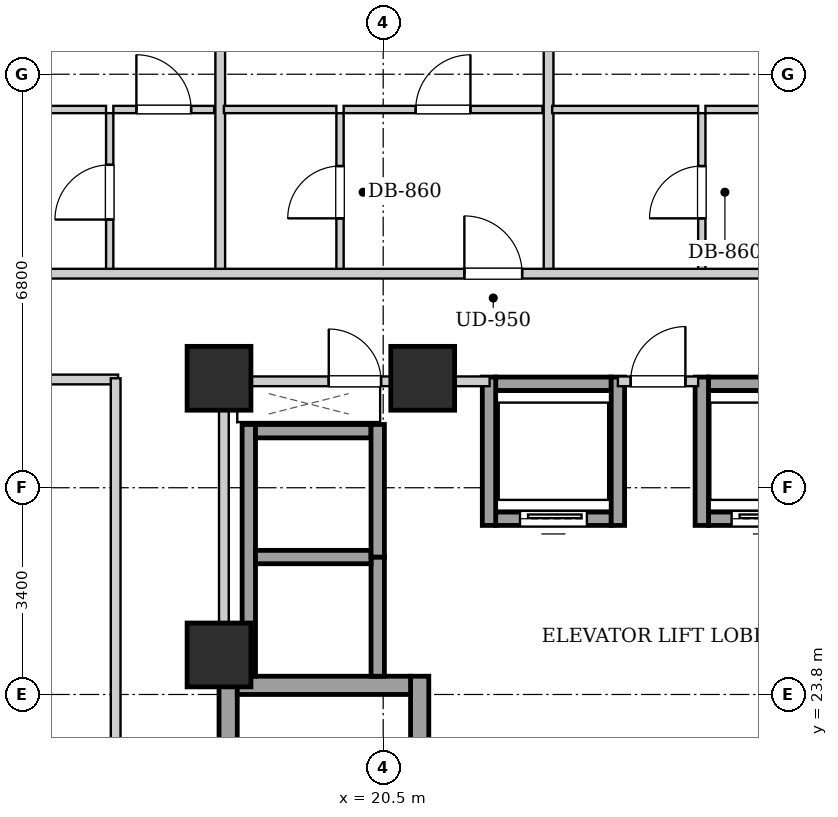
"""IFC4 building model, lengths in metres.
Left out: names, types, materials, properties, quantities, classifications, styles, units other than length and angle.
Written with IfcOpenShell. Run it as: python <this file> out.ifc"""

import sys

from ifc_helpers import new_model, si_unit, direction, frame, frame_2d, origin, origin_2d, place, context, subcontext, project, spatial, rectangle, extrude, element, fill, save


model = new_model("IFC4")
c1 = context("Model", 3, precision=1e-05, world=origin(), true_north=direction((0.0, 1.0)))
c2 = subcontext(c1, "Body", "Model", "MODEL_VIEW")
j1 = project(units=[si_unit("LENGTHUNIT", "METRE"), si_unit("PLANEANGLEUNIT", "RADIAN")], contexts=[c1])
p1 = place(None, origin())
s1 = spatial("IfcSite", under=j1, at=p1, CompositionType="ELEMENT")
p2 = place(p1, origin())
s2 = spatial("IfcBuilding", under=s1, at=p2, CompositionType="ELEMENT")
p3 = place(p2, frame((0.0, 0.0, 103.9)))
s3 = spatial("IfcBuildingStorey", under=s2, at=p3, CompositionType="ELEMENT", Elevation=103.9)
for number, where, z_axis, x_axis in (
    (1, (17.8, 29.0, 0.0), (0.0, 0.0, 1.0), (1.0, 0.0, 0.0)),
    (2, (21.15, 29.0, 0.0), (0.0, 0.0, 1.0), (1.0, 0.0, 0.0)),
    (3, (17.8, 24.45, 0.0), (0.0, 0.0, 1.0), (1.0, 0.0, 0.0)),
):
    element("IfcColumn", number, at=place(p3, frame(where, z_axis=z_axis, x_axis=x_axis)), inside=s3, PredefinedType="COLUMN", context=c2, shape_type="SweptSolid", body=[
        extrude(rectangle(XDim=1.05, YDim=1.05, at=origin_2d()), origin(), (0.0, 0.0, 1.0), 3.2),
    ])
for number, where, z_axis, x_axis in (
    (4, (17.95, 15.1, 0.0), (0.0, 0.0, 1.0), (0.0, 1.0, 0.0)),
    (5, (21.1, 15.1, 0.0), (0.0, 0.0, 1.0), (0.0, 1.0, 0.0)),
):
    element("IfcWall", number, at=place(p3, frame(where, z_axis=z_axis, x_axis=x_axis)), inside=s3, PredefinedType="SHEAR", context=c2, shape_type="SweptSolid", body=[
        extrude(rectangle(XDim=9.0, YDim=0.3, at=frame_2d((4.5, 0.0))), origin(), (0.0, 0.0, 1.0), 2.94),
    ])
p4 = place(p3, frame((18.1, 23.95, 0.0), z_axis=(0.0, 0.0, 1.0), x_axis=(1.0, 0.0, 0.0)))
e6 = element("IfcWall", 6, at=p4, inside=s3, PredefinedType="SHEAR", context=c2, shape_type="SweptSolid", body=[
    extrude(rectangle(XDim=2.85, YDim=0.3, at=frame_2d((1.425, 0.0))), origin(), (0.0, 0.0, 1.0), 2.94),
])
p5 = place(p3, frame((22.35, 26.69, 0.0), z_axis=(0.0, 0.0, 1.0), x_axis=(1.0, 0.0, 0.0)))
e7 = element("IfcWall", 7, at=p5, inside=s3, PredefinedType="SHEAR", context=c2, shape_type="SweptSolid", body=[
    extrude(rectangle(XDim=1.9, YDim=0.22, at=frame_2d((0.95, 0.0))), origin(), (0.0, 0.0, 1.0), 2.94),
])
p6 = place(p5, frame((0.4, 0.0, 0.0)))
e8 = element("IfcOpeningElement", 8, at=p6, cuts=e7, PredefinedType="OPENING", context=c2, shape_type="SweptSolid", body=[
    extrude(rectangle(XDim=1.1, YDim=2.15, at=frame_2d((0.55, 1.075))), frame((0.0, 0.12, 0.0), z_axis=(0.0, -1.0, 0.0), x_axis=(1.0, 0.0, 0.0)), (0.0, 0.0, 1.0), 0.24),
])
p7 = place(p3, frame((22.35, 28.91, 0.0), z_axis=(0.0, 0.0, 1.0), x_axis=(1.0, 0.0, 0.0)))
e9 = element("IfcWall", 9, at=p7, inside=s3, PredefinedType="SHEAR", context=c2, shape_type="SweptSolid", body=[
    extrude(rectangle(XDim=1.9, YDim=0.22, at=frame_2d((0.95, 0.0))), origin(), (0.0, 0.0, 1.0), 2.94),
])
for number, where, z_axis, x_axis in (
    (10, (22.24, 26.58, 0.0), (0.0, 0.0, 1.0), (0.0, 1.0, 0.0)),
    (11, (24.36, 26.58, 0.0), (0.0, 0.0, 1.0), (0.0, 1.0, 0.0)),
):
    element("IfcWall", number, at=place(p3, frame(where, z_axis=z_axis, x_axis=x_axis)), inside=s3, PredefinedType="SHEAR", context=c2, shape_type="SweptSolid", body=[
        extrude(rectangle(XDim=2.44, YDim=0.22, at=frame_2d((1.22, 0.0))), origin(), (0.0, 0.0, 1.0), 2.94),
    ])
p8 = place(p3, frame((25.85, 26.69, 0.0), z_axis=(0.0, 0.0, 1.0), x_axis=(1.0, 0.0, 0.0)))
e12 = element("IfcWall", 12, at=p8, inside=s3, PredefinedType="SHEAR", context=c2, shape_type="SweptSolid", body=[
    extrude(rectangle(XDim=1.86, YDim=0.22, at=frame_2d((0.93, 0.0))), origin(), (0.0, 0.0, 1.0), 2.94),
])
p9 = place(p8, frame((0.38, 0.0, 0.0)))
e13 = element("IfcOpeningElement", 13, at=p9, cuts=e12, PredefinedType="OPENING", context=c2, shape_type="SweptSolid", body=[
    extrude(rectangle(XDim=1.1, YDim=2.15, at=frame_2d((0.55, 1.075))), frame((0.0, 0.12, 0.0), z_axis=(0.0, -1.0, 0.0), x_axis=(1.0, 0.0, 0.0)), (0.0, 0.0, 1.0), 0.24),
])
p10 = place(p3, frame((25.85, 28.91, 0.0), z_axis=(0.0, 0.0, 1.0), x_axis=(1.0, 0.0, 0.0)))
e14 = element("IfcWall", 14, at=p10, inside=s3, PredefinedType="SHEAR", context=c2, shape_type="SweptSolid", body=[
    extrude(rectangle(XDim=1.86, YDim=0.22, at=frame_2d((0.93, 0.0))), origin(), (0.0, 0.0, 1.0), 2.94),
])
p11 = place(p3, frame((25.74, 26.58, 0.0), z_axis=(0.0, 0.0, 1.0), x_axis=(0.0, 1.0, 0.0)))
e15 = element("IfcWall", 15, at=p11, inside=s3, PredefinedType="SHEAR", context=c2, shape_type="SweptSolid", body=[
    extrude(rectangle(XDim=2.44, YDim=0.22, at=frame_2d((1.22, 0.0))), origin(), (0.0, 0.0, 1.0), 2.94),
])
p12 = place(p3, frame((18.29, 24.1, 0.0), z_axis=(0.0, 0.0, 1.0), x_axis=(0.0, 1.0, 0.0)))
e16 = element("IfcWall", 16, at=p12, inside=s3, PredefinedType="SHEAR", context=c2, shape_type="SweptSolid", body=[
    extrude(rectangle(XDim=4.14, YDim=0.22, at=frame_2d((2.07, 0.0))), origin(), (0.0, 0.0, 1.0), 2.94),
])
p13 = place(p3, frame((20.41, 24.1, 0.0), z_axis=(0.0, 0.0, 1.0), x_axis=(0.0, 1.0, 0.0)))
e17 = element("IfcWall", 17, at=p13, inside=s3, PredefinedType="SHEAR", context=c2, shape_type="SweptSolid", body=[
    extrude(rectangle(XDim=1.96, YDim=0.22, at=frame_2d((0.98, 0.0))), origin(), (0.0, 0.0, 1.0), 2.94),
])
for number, where, z_axis, x_axis in (
    (18, (18.4, 26.06, 0.0), (0.0, 0.0, 1.0), (1.0, 0.0, 0.0)),
    (19, (18.4, 28.13, 0.0), (0.0, 0.0, 1.0), (1.0, 0.0, 0.0)),
):
    element("IfcWall", number, at=place(p3, frame(where, z_axis=z_axis, x_axis=x_axis)), inside=s3, PredefinedType="SHEAR", context=c2, shape_type="SweptSolid", body=[
        extrude(rectangle(XDim=1.9, YDim=0.22, at=frame_2d((0.95, 0.0))), origin(), (0.0, 0.0, 1.0), 2.94),
    ])
p14 = place(p3, frame((20.41, 26.06, 0.0), z_axis=(0.0, 0.0, 1.0), x_axis=(0.0, 1.0, 0.0)))
e20 = element("IfcWall", 20, at=p14, inside=s3, PredefinedType="SHEAR", context=c2, shape_type="SweptSolid", body=[
    extrude(rectangle(XDim=2.18, YDim=0.22, at=frame_2d((1.09, 0.0))), origin(), (0.0, 0.0, 1.0), 2.94),
])
p15 = place(p3, frame((17.88, 24.12, 0.0), z_axis=(0.0, 0.0, 1.0), x_axis=(0.0, 1.0, 0.0)))
e21 = element("IfcWall", 21, at=p15, inside=s3, PredefinedType="PARTITIONING", context=c2, shape_type="SweptSolid", body=[
    extrude(rectangle(XDim=4.76, YDim=0.16, at=frame_2d((2.38, 0.0))), origin(), (0.0, 0.0, 1.0), 2.94),
])
p16 = place(p3, frame((24.36, 28.95, 0.0), z_axis=(0.0, 0.0, 1.0), x_axis=(1.0, 0.0, 0.0)))
e22 = element("IfcWall", 22, at=p16, inside=s3, PredefinedType="PARTITIONING", context=c2, shape_type="SweptSolid", body=[
    extrude(rectangle(XDim=1.32, YDim=0.16, at=frame_2d((0.66, 0.0))), origin(), (0.0, 0.0, 1.0), 2.313),
])
p17 = place(p16, frame((0.21, 0.0, 0.0)))
e23 = element("IfcOpeningElement", 23, at=p17, cuts=e22, PredefinedType="OPENING", context=c2, shape_type="SweptSolid", body=[
    extrude(rectangle(XDim=0.9, YDim=2.05, at=frame_2d((0.45, 1.025))), frame((0.0, 0.09, 0.0), z_axis=(0.0, -1.0, 0.0), x_axis=(1.0, 0.0, 0.0)), (0.0, 0.0, 1.0), 0.18),
])
p18 = place(p3, frame((17.96, 28.95, 0.0), z_axis=(0.0, 0.0, 1.0), x_axis=(1.0, 0.0, 0.0)))
e24 = element("IfcWall", 24, at=p18, inside=s3, PredefinedType="PARTITIONING", context=c2, shape_type="SweptSolid", body=[
    extrude(rectangle(XDim=4.29, YDim=0.16, at=frame_2d((2.145, 0.0))), origin(), (0.0, 0.0, 1.0), 2.313),
])
p19 = place(p18, frame((1.645, 0.0, 0.0)))
e25 = element("IfcOpeningElement", 25, at=p19, cuts=e24, PredefinedType="OPENING", context=c2, shape_type="SweptSolid", body=[
    extrude(rectangle(XDim=0.86, YDim=2.05, at=frame_2d((0.43, 1.025))), frame((0.0, 0.09, 0.0), z_axis=(0.0, -1.0, 0.0), x_axis=(1.0, 0.0, 0.0)), (0.0, 0.0, 1.0), 0.18),
])
p20 = place(p3, frame((7.78, 28.98, 0.0), z_axis=(0.0, 0.0, 1.0), x_axis=(1.0, 0.0, 0.0)))
e26 = element("IfcWall", 26, at=p20, inside=s3, PredefinedType="PARTITIONING", context=c2, shape_type="SweptSolid", body=[
    extrude(rectangle(XDim=8.36, YDim=0.16, at=frame_2d((4.18, 0.0))), origin(), (0.0, 0.0, 1.0), 2.313),
])
p21 = place(p3, frame((16.002, 30.76, 0.0), z_axis=(0.0, 0.0, 1.0), x_axis=(0.0, 1.0, 0.0)))
e27 = element("IfcWall", 27, at=p21, inside=s3, PredefinedType="PARTITIONING", context=c2, shape_type="SweptSolid", body=[
    extrude(rectangle(XDim=2.6, YDim=0.12, at=frame_2d((1.3, 0.0))), origin(), (0.0, 0.0, 1.0), 2.94),
])
p22 = place(p21, frame((0.85, 0.0, 0.0)))
e28 = element("IfcOpeningElement", 28, at=p22, cuts=e27, PredefinedType="OPENING", context=c2, shape_type="SweptSolid", body=[
    extrude(rectangle(XDim=0.9, YDim=2.05, at=frame_2d((0.45, 1.025))), frame((0.0, 0.07, 0.0), z_axis=(0.0, -1.0, 0.0), x_axis=(1.0, 0.0, 0.0)), (0.0, 0.0, 1.0), 0.14),
])
p23 = place(p3, frame((12.492, 33.42, 0.0), z_axis=(0.0, 0.0, 1.0), x_axis=(1.0, 0.0, 0.0)))
e29 = element("IfcWall", 29, at=p23, inside=s3, PredefinedType="PARTITIONING", context=c2, shape_type="SweptSolid", body=[
    extrude(rectangle(XDim=3.45, YDim=0.12, at=frame_2d((1.725, 0.0))), origin(), (0.0, 0.0, 1.0), 2.94),
])
p24 = place(p23, frame((1.275, 0.0, 0.0)))
e30 = element("IfcOpeningElement", 30, at=p24, cuts=e29, PredefinedType="OPENING", context=c2, shape_type="SweptSolid", body=[
    extrude(rectangle(XDim=0.9, YDim=2.05, at=frame_2d((0.45, 1.025))), frame((0.0, 0.07, 0.0), z_axis=(0.0, -1.0, 0.0), x_axis=(1.0, 0.0, 0.0)), (0.0, 0.0, 1.0), 0.14),
])
p25 = place(p3, frame((16.062, 33.42, 0.0), z_axis=(0.0, 0.0, 1.0), x_axis=(1.0, 0.0, 0.0)))
e31 = element("IfcWall", 31, at=p25, inside=s3, PredefinedType="PARTITIONING", context=c2, shape_type="SweptSolid", body=[
    extrude(rectangle(XDim=1.658, YDim=0.12, at=frame_2d((0.829, 0.0))), origin(), (0.0, 0.0, 1.0), 2.94),
])
p26 = place(p25, frame((0.379, 0.0, 0.0)))
e32 = element("IfcOpeningElement", 32, at=p26, cuts=e31, PredefinedType="OPENING", context=c2, shape_type="SweptSolid", body=[
    extrude(rectangle(XDim=0.9, YDim=2.05, at=frame_2d((0.45, 1.025))), frame((0.0, 0.07, 0.0), z_axis=(0.0, -1.0, 0.0), x_axis=(1.0, 0.0, 0.0)), (0.0, 0.0, 1.0), 0.14),
])
p27 = place(p3, frame((17.82, 30.76, 0.0), z_axis=(0.0, 0.0, 1.0), x_axis=(0.0, 1.0, 0.0)))
e33 = element("IfcWall", 33, at=p27, inside=s3, PredefinedType="PARTITIONING", context=c2, shape_type="SweptSolid", body=[
    extrude(rectangle(XDim=12.26, YDim=0.16, at=frame_2d((6.13, 0.0))), origin(), (0.0, 0.0, 1.0), 2.313),
])
p28 = place(p3, frame((19.79, 30.76, 0.0), z_axis=(0.0, 0.0, 1.0), x_axis=(0.0, 1.0, 0.0)))
e34 = element("IfcWall", 34, at=p28, inside=s3, PredefinedType="PARTITIONING", context=c2, shape_type="SweptSolid", body=[
    extrude(rectangle(XDim=2.6, YDim=0.12, at=frame_2d((1.3, 0.0))), origin(), (0.0, 0.0, 1.0), 2.94),
])
p29 = place(p28, frame((0.87, 0.0, 0.0)))
e35 = element("IfcOpeningElement", 35, at=p29, cuts=e34, PredefinedType="OPENING", context=c2, shape_type="SweptSolid", body=[
    extrude(rectangle(XDim=0.86, YDim=2.05, at=frame_2d((0.43, 1.025))), frame((0.0, 0.07, 0.0), z_axis=(0.0, -1.0, 0.0), x_axis=(1.0, 0.0, 0.0)), (0.0, 0.0, 1.0), 0.14),
])
p30 = place(p3, frame((17.88, 33.42, 0.0), z_axis=(0.0, 0.0, 1.0), x_axis=(1.0, 0.0, 0.0)))
e36 = element("IfcWall", 36, at=p30, inside=s3, PredefinedType="PARTITIONING", context=c2, shape_type="SweptSolid", body=[
    extrude(rectangle(XDim=1.85, YDim=0.12, at=frame_2d((0.925, 0.0))), origin(), (0.0, 0.0, 1.0), 2.94),
])
p31 = place(p3, frame((19.85, 33.42, 0.0), z_axis=(0.0, 0.0, 1.0), x_axis=(1.0, 0.0, 0.0)))
e37 = element("IfcWall", 37, at=p31, inside=s3, PredefinedType="PARTITIONING", context=c2, shape_type="SweptSolid", body=[
    extrude(rectangle(XDim=3.27, YDim=0.12, at=frame_2d((1.635, 0.0))), origin(), (0.0, 0.0, 1.0), 2.94),
])
p32 = place(p31, frame((1.185, 0.0, 0.0)))
e38 = element("IfcOpeningElement", 38, at=p32, cuts=e37, PredefinedType="OPENING", context=c2, shape_type="SweptSolid", body=[
    extrude(rectangle(XDim=0.9, YDim=2.05, at=frame_2d((0.45, 1.025))), frame((0.0, 0.07, 0.0), z_axis=(0.0, -1.0, 0.0), x_axis=(1.0, 0.0, 0.0)), (0.0, 0.0, 1.0), 0.14),
])
p33 = place(p3, frame((23.22, 30.76, 0.0), z_axis=(0.0, 0.0, 1.0), x_axis=(0.0, 1.0, 0.0)))
e39 = element("IfcWall", 39, at=p33, inside=s3, PredefinedType="PARTITIONING", context=c2, shape_type="SweptSolid", body=[
    extrude(rectangle(XDim=12.26, YDim=0.16, at=frame_2d((6.13, 0.0))), origin(), (0.0, 0.0, 1.0), 2.94),
])
p34 = place(p3, frame((25.74, 30.76, 0.0), z_axis=(0.0, 0.0, 1.0), x_axis=(0.0, 1.0, 0.0)))
e40 = element("IfcWall", 40, at=p34, inside=s3, PredefinedType="PARTITIONING", context=c2, shape_type="SweptSolid", body=[
    extrude(rectangle(XDim=2.6, YDim=0.12, at=frame_2d((1.3, 0.0))), origin(), (0.0, 0.0, 1.0), 2.94),
])
p35 = place(p34, frame((0.87, 0.0, 0.0)))
e41 = element("IfcOpeningElement", 41, at=p35, cuts=e40, PredefinedType="OPENING", context=c2, shape_type="SweptSolid", body=[
    extrude(rectangle(XDim=0.86, YDim=2.05, at=frame_2d((0.43, 1.025))), frame((0.0, 0.07, 0.0), z_axis=(0.0, -1.0, 0.0), x_axis=(1.0, 0.0, 0.0)), (0.0, 0.0, 1.0), 0.14),
])
p36 = place(p3, frame((23.28, 33.42, 0.0), z_axis=(0.0, 0.0, 1.0), x_axis=(1.0, 0.0, 0.0)))
e42 = element("IfcWall", 42, at=p36, inside=s3, PredefinedType="PARTITIONING", context=c2, shape_type="SweptSolid", body=[
    extrude(rectangle(XDim=2.4, YDim=0.12, at=frame_2d((1.2, 0.0))), origin(), (0.0, 0.0, 1.0), 2.94),
])
p37 = place(p3, frame((25.8, 33.42, 0.0), z_axis=(0.0, 0.0, 1.0), x_axis=(1.0, 0.0, 0.0)))
e43 = element("IfcWall", 43, at=p37, inside=s3, PredefinedType="PARTITIONING", context=c2, shape_type="SweptSolid", body=[
    extrude(rectangle(XDim=2.838, YDim=0.12, at=frame_2d((1.419, 0.0))), origin(), (0.0, 0.0, 1.0), 2.94),
])
p38 = place(p37, frame((0.969, 0.0, 0.0)))
e44 = element("IfcOpeningElement", 44, at=p38, cuts=e43, PredefinedType="OPENING", context=c2, shape_type="SweptSolid", body=[
    extrude(rectangle(XDim=0.9, YDim=2.05, at=frame_2d((0.45, 1.025))), frame((0.0, 0.07, 0.0), z_axis=(0.0, -1.0, 0.0), x_axis=(1.0, 0.0, 0.0)), (0.0, 0.0, 1.0), 0.14),
])
p39 = place(p3, frame((10.05, 30.72, 0.0), z_axis=(0.0, 0.0, 1.0), x_axis=(1.0, 0.0, 0.0)))
e45 = element("IfcWall", 45, at=p39, inside=s3, PredefinedType="PARTITIONING", context=c2, shape_type="SweptSolid", body=[
    extrude(rectangle(XDim=30.8, YDim=0.16, at=frame_2d((15.4, 0.0))), origin(), (0.0, 0.0, 1.0), 2.94),
])
p40 = place(p39, frame((3.692, 0.0, 0.0)))
e46 = element("IfcOpeningElement", 46, at=p40, cuts=e45, PredefinedType="OPENING", context=c2, shape_type="SweptSolid", body=[
    extrude(rectangle(XDim=0.95, YDim=2.1, at=frame_2d((0.475, 1.05))), frame((0.0, 0.09, 0.0), z_axis=(0.0, -1.0, 0.0), x_axis=(1.0, 0.0, 0.0)), (0.0, 0.0, 1.0), 0.18),
])
p41 = place(p39, frame((11.785, 0.0, 0.0)))
e47 = element("IfcOpeningElement", 47, at=p41, cuts=e45, PredefinedType="OPENING", context=c2, shape_type="SweptSolid", body=[
    extrude(rectangle(XDim=0.95, YDim=2.1, at=frame_2d((0.475, 1.05))), frame((0.0, 0.09, 0.0), z_axis=(0.0, -1.0, 0.0), x_axis=(1.0, 0.0, 0.0)), (0.0, 0.0, 1.0), 0.18),
])
p42 = place(p39, frame((17.235, 0.0, 0.0)))
e48 = element("IfcOpeningElement", 48, at=p42, cuts=e45, PredefinedType="OPENING", context=c2, shape_type="SweptSolid", body=[
    extrude(rectangle(XDim=0.95, YDim=2.1, at=frame_2d((0.475, 1.05))), frame((0.0, 0.09, 0.0), z_axis=(0.0, -1.0, 0.0), x_axis=(1.0, 0.0, 0.0)), (0.0, 0.0, 1.0), 0.18),
])
p43 = place(p39, frame((28.64, 0.0, 0.0)))
e49 = element("IfcOpeningElement", 49, at=p43, cuts=e45, PredefinedType="OPENING", context=c2, shape_type="SweptSolid", body=[
    extrude(rectangle(XDim=0.95, YDim=2.1, at=frame_2d((0.475, 1.05))), frame((0.0, 0.09, 0.0), z_axis=(0.0, -1.0, 0.0), x_axis=(1.0, 0.0, 0.0)), (0.0, 0.0, 1.0), 0.18),
])
p44 = place(p3, frame((16.1, 15.07, 0.0), z_axis=(0.0, 0.0, 1.0), x_axis=(0.0, 1.0, 0.0)))
e50 = element("IfcWall", 50, at=p44, inside=s3, PredefinedType="PARTITIONING", context=c2, shape_type="SweptSolid", body=[
    extrude(rectangle(XDim=13.93, YDim=0.16, at=frame_2d((6.965, 0.0))), origin(), (0.0, 0.0, 1.0), 2.94),
])
p45 = place(p44, frame((4.385, 0.0, 0.0)))
e51 = element("IfcOpeningElement", 51, at=p45, cuts=e50, PredefinedType="OPENING", context=c2, shape_type="SweptSolid", body=[
    extrude(rectangle(XDim=0.95, YDim=2.1, at=frame_2d((0.475, 1.05))), frame((0.0, 0.09, 0.0), z_axis=(0.0, -1.0, 0.0), x_axis=(1.0, 0.0, 0.0)), (0.0, 0.0, 1.0), 0.18),
])
p46 = place(p6, origin())
e52 = element("IfcDoor", 52, at=p46, inside=s3, OperationType="SLIDING_TO_LEFT", PredefinedType="DOOR", context=c2, shape_type="SweptSolid", body=[
    extrude(rectangle(XDim=1.1, YDim=2.15, at=frame_2d((0.55, 1.075))), frame((0.0, 0.025, 0.0), z_axis=(0.0, -1.0, 0.0), x_axis=(1.0, 0.0, 0.0)), (0.0, 0.0, 1.0), 0.05),
])
fill(e8, e52)
p47 = place(p9, origin())
e53 = element("IfcDoor", 53, at=p47, inside=s3, OperationType="SLIDING_TO_LEFT", PredefinedType="DOOR", context=c2, shape_type="SweptSolid", body=[
    extrude(rectangle(XDim=1.1, YDim=2.15, at=frame_2d((0.55, 1.075))), frame((0.0, 0.025, 0.0), z_axis=(0.0, -1.0, 0.0), x_axis=(1.0, 0.0, 0.0)), (0.0, 0.0, 1.0), 0.05),
])
fill(e13, e53)
p48 = place(p17, origin())
e54 = element("IfcDoor", 54, at=p48, inside=s3, OperationType="SINGLE_SWING_RIGHT", PredefinedType="DOOR", context=c2, shape_type="SweptSolid", body=[
    extrude(rectangle(XDim=0.9, YDim=2.05, at=frame_2d((0.45, 1.025))), frame((0.0, 0.025, 0.0), z_axis=(0.0, -1.0, 0.0), x_axis=(1.0, 0.0, 0.0)), (0.0, 0.0, 1.0), 0.05),
])
fill(e23, e54)
p49 = place(p19, origin())
e55 = element("IfcDoor", 55, at=p49, inside=s3, OperationType="SINGLE_SWING_LEFT", PredefinedType="DOOR", context=c2, shape_type="SweptSolid", body=[
    extrude(rectangle(XDim=0.86, YDim=2.05, at=frame_2d((0.43, 1.025))), frame((0.0, 0.025, 0.0), z_axis=(0.0, -1.0, 0.0), x_axis=(1.0, 0.0, 0.0)), (0.0, 0.0, 1.0), 0.05),
])
fill(e25, e55)
p50 = place(p22, origin())
e56 = element("IfcDoor", 56, at=p50, inside=s3, OperationType="SINGLE_SWING_LEFT", PredefinedType="DOOR", context=c2, shape_type="SweptSolid", body=[
    extrude(rectangle(XDim=0.9, YDim=2.05, at=frame_2d((0.45, 1.025))), frame((0.0, 0.025, 0.0), z_axis=(0.0, -1.0, 0.0), x_axis=(1.0, 0.0, 0.0)), (0.0, 0.0, 1.0), 0.05),
])
fill(e28, e56)
p51 = place(p26, origin())
e57 = element("IfcDoor", 57, at=p51, inside=s3, OperationType="SINGLE_SWING_LEFT", PredefinedType="DOOR", context=c2, shape_type="SweptSolid", body=[
    extrude(rectangle(XDim=0.9, YDim=2.05, at=frame_2d((0.45, 1.025))), frame((0.0, 0.025, 0.0), z_axis=(0.0, -1.0, 0.0), x_axis=(1.0, 0.0, 0.0)), (0.0, 0.0, 1.0), 0.05),
])
fill(e32, e57)
p52 = place(p29, origin())
e58 = element("IfcDoor", 58, at=p52, inside=s3, OperationType="SINGLE_SWING_LEFT", PredefinedType="DOOR", context=c2, shape_type="SweptSolid", body=[
    extrude(rectangle(XDim=0.86, YDim=2.05, at=frame_2d((0.43, 1.025))), frame((0.0, 0.025, 0.0), z_axis=(0.0, -1.0, 0.0), x_axis=(1.0, 0.0, 0.0)), (0.0, 0.0, 1.0), 0.05),
])
fill(e35, e58)
p53 = place(p32, origin())
e59 = element("IfcDoor", 59, at=p53, inside=s3, OperationType="SINGLE_SWING_RIGHT", PredefinedType="DOOR", context=c2, shape_type="SweptSolid", body=[
    extrude(rectangle(XDim=0.9, YDim=2.05, at=frame_2d((0.45, 1.025))), frame((0.0, 0.025, 0.0), z_axis=(0.0, -1.0, 0.0), x_axis=(1.0, 0.0, 0.0)), (0.0, 0.0, 1.0), 0.05),
])
fill(e38, e59)
p54 = place(p35, origin())
e60 = element("IfcDoor", 60, at=p54, inside=s3, OperationType="SINGLE_SWING_LEFT", PredefinedType="DOOR", context=c2, shape_type="SweptSolid", body=[
    extrude(rectangle(XDim=0.86, YDim=2.05, at=frame_2d((0.43, 1.025))), frame((0.0, 0.025, 0.0), z_axis=(0.0, -1.0, 0.0), x_axis=(1.0, 0.0, 0.0)), (0.0, 0.0, 1.0), 0.05),
])
fill(e41, e60)
p55 = place(p41, origin())
e61 = element("IfcDoor", 61, at=p55, inside=s3, OperationType="SINGLE_SWING_LEFT", PredefinedType="DOOR", context=c2, shape_type="SweptSolid", body=[
    extrude(rectangle(XDim=0.95, YDim=2.1, at=frame_2d((0.475, 1.05))), frame((0.0, 0.025, 0.0), z_axis=(0.0, -1.0, 0.0), x_axis=(1.0, 0.0, 0.0)), (0.0, 0.0, 1.0), 0.05),
])
fill(e47, e61)
save(model, sys.argv[1])
